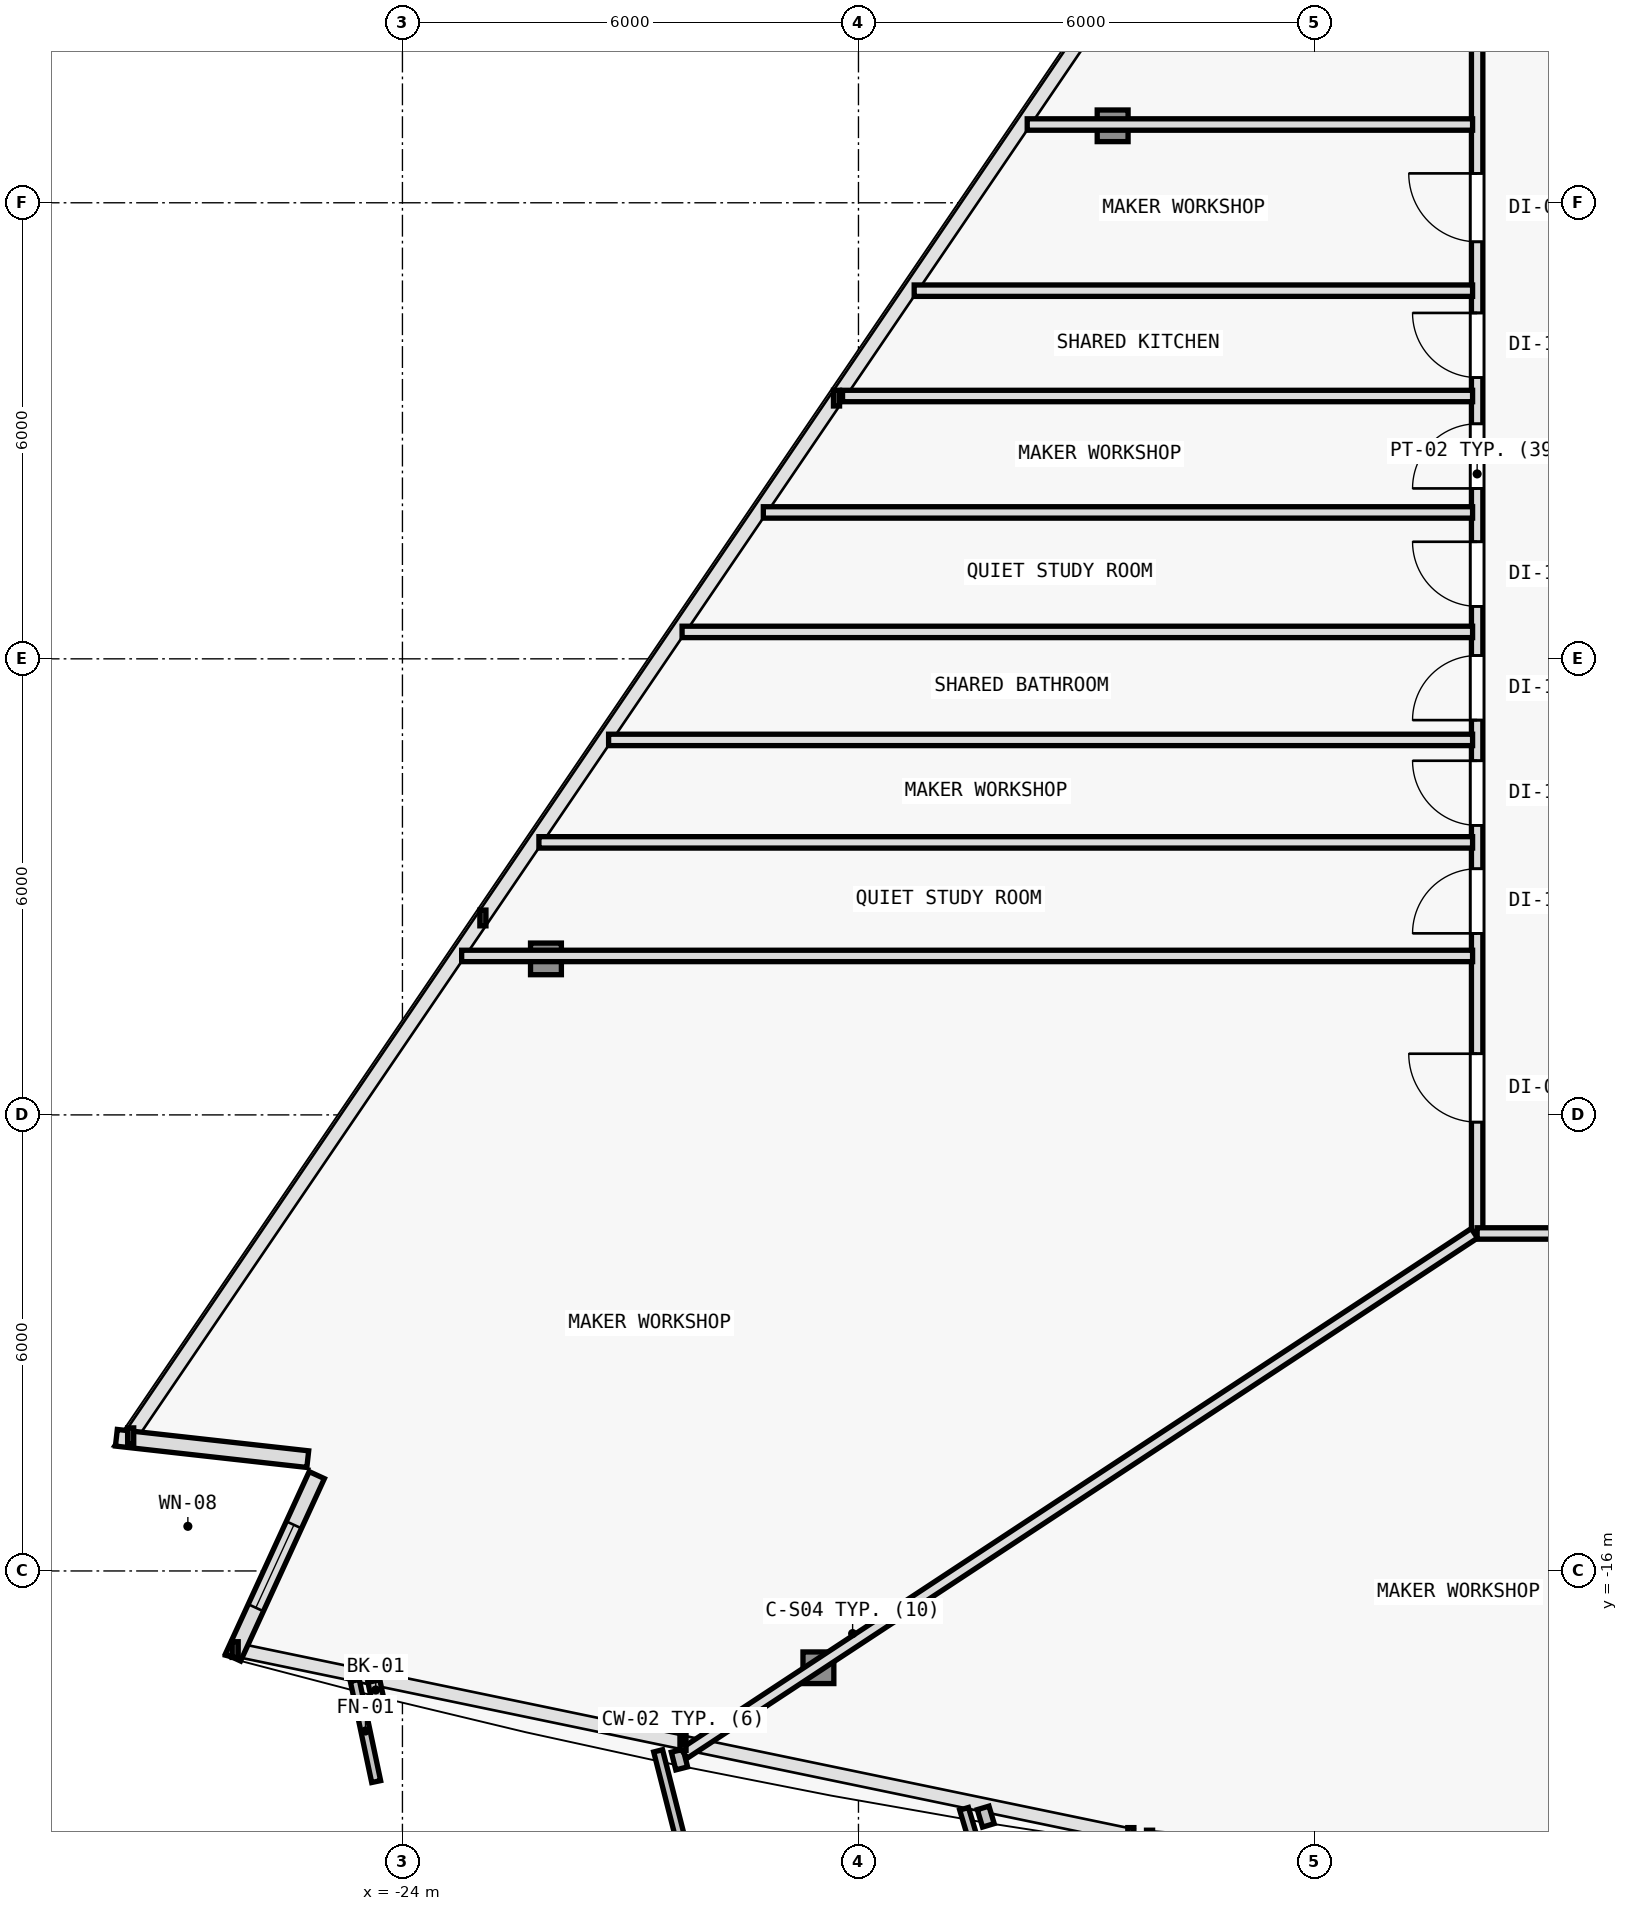
"""IFC4 building model, lengths in metres.
Left out: names, types, materials, properties, quantities, classifications, styles, units other than length and angle.
Written with IfcOpenShell. Run it as: python <this file> out.ifc"""

import sys

from ifc_helpers import new_model, si_unit, direction, frame, frame_2d, origin, origin_2d, place, context, subcontext, project, spatial, rectangle, i_section, extrude, element, fill, save


model = new_model("IFC4")
c1 = context("Model", 3, precision=1e-05, world=origin(), true_north=direction((0.0, 1.0)))
c2 = subcontext(c1, "Body", "Model", "MODEL_VIEW")
j1 = project(units=[si_unit("LENGTHUNIT", "METRE"), si_unit("PLANEANGLEUNIT", "RADIAN")], contexts=[c1])
p1 = place(None, origin())
s1 = spatial("IfcSite", under=j1, at=p1, CompositionType="ELEMENT")
p2 = place(p1, origin())
s2 = spatial("IfcBuilding", under=s1, at=p2, CompositionType="ELEMENT")
p3 = place(p2, frame((0.0, 0.0, 118.5)))
s3 = spatial("IfcBuildingStorey", under=s2, at=p3, CompositionType="ELEMENT", Elevation=118.5)
p4 = place(p3, frame((-18.527, -17.274, 0.006), z_axis=(0.020664238418, 0.033511412961, 0.999224686671), x_axis=(-0.851183725565, 0.524867855115, 0.0)))
e1 = element("IfcColumn", 1, at=p4, inside=s3, PredefinedType="COLUMN", context=c2, shape_type="SweptSolid", body=[
    extrude(i_section(OverallWidth=0.406, OverallDepth=0.416, WebThickness=0.019, FlangeThickness=0.031, FilletRadius=0.015, at=origin_2d()), origin(), (0.0, 0.0, 1.0), 3.592),
])
p5 = place(p3, frame((-14.656, 3.013, 0.006), z_axis=(0.017003572908, 0.009522000828, 0.999810086971), x_axis=(-0.488603368932, 0.87250601595, 0.0)))
e2 = element("IfcColumn", 2, at=p5, inside=s3, PredefinedType="COLUMN", context=c2, shape_type="SweptSolid", body=[
    extrude(i_section(OverallWidth=0.406, OverallDepth=0.416, WebThickness=0.019, FlangeThickness=0.031, FilletRadius=0.015, at=origin_2d()), origin(), (0.0, 0.0, 1.0), 3.59),
])
p6 = place(p3, frame((-22.112, -7.948, 0.006), z_axis=(0.025292109804, 0.02162067451, 0.999446274502), x_axis=(-0.649781149204, 0.760121344352, 0.0)))
e3 = element("IfcColumn", 3, at=p6, inside=s3, PredefinedType="COLUMN", context=c2, shape_type="SweptSolid", body=[
    extrude(i_section(OverallWidth=0.406, OverallDepth=0.416, WebThickness=0.019, FlangeThickness=0.031, FilletRadius=0.015, at=origin_2d()), origin(), (0.0, 0.0, 1.0), 3.591),
])
p7 = place(p3, frame((-25.246, -14.529, 0.0), z_axis=(0.0, 0.0, 1.0), x_axis=(-0.993831926713, 0.110896805395, 0.0)))
e4 = element("IfcWall", 4, at=p7, inside=s3, PredefinedType="SOLIDWALL", context=c2, shape_type="SweptSolid", body=[
    extrude(rectangle(XDim=2.534, YDim=0.22, at=frame_2d((1.267, 0.0))), origin(), (0.0, 0.0, 1.0), 3.35),
])
p8 = place(p3, frame((-26.229, -17.139, 0.0), z_axis=(0.0, 0.0, 1.0), x_axis=(0.417498108462, 0.908677791866, 0.0)))
e5 = element("IfcWall", 5, at=p8, inside=s3, PredefinedType="SOLIDWALL", context=c2, shape_type="SweptSolid", body=[
    extrude(rectangle(XDim=2.641, YDim=0.22, at=frame_2d((1.32, 0.0))), origin(), (0.0, 0.0, 1.0), 3.35),
])
p9 = place(p8, frame((0.72, 0.0, 0.62)))
e6 = element("IfcOpeningElement", 6, at=p9, cuts=e5, PredefinedType="OPENING", context=c2, shape_type="SweptSolid", body=[
    extrude(rectangle(XDim=1.2, YDim=1.8, at=frame_2d((0.6, 0.9))), frame((0.0, 0.12, 0.0), z_axis=(0.0, -1.0, 0.0), x_axis=(1.0, 0.0, 0.0)), (0.0, 0.0, 1.0), 0.24),
])
p10 = place(p3, frame((-9.86, -11.56, 0.0), z_axis=(0.0, 0.0, 1.0), x_axis=(0.0, 1.0, 0.0)))
e7 = element("IfcWall", 7, at=p10, inside=s3, PredefinedType="PARTITIONING", context=c2, shape_type="SweptSolid", body=[
    extrude(rectangle(XDim=19.986, YDim=0.15, at=frame_2d((9.993, 0.0))), origin(), (0.0, 0.0, 1.0), 2.705),
])
p11 = place(p10, frame((11.261, 0.0, 0.0)))
e8 = element("IfcOpeningElement", 8, at=p11, cuts=e7, PredefinedType="OPENING", context=c2, shape_type="SweptSolid", body=[
    extrude(rectangle(XDim=0.85, YDim=2.1, at=frame_2d((0.425, 1.05))), frame((0.0, 0.085, 0.0), z_axis=(0.0, -1.0, 0.0), x_axis=(1.0, 0.0, 0.0)), (0.0, 0.0, 1.0), 0.17),
])
p12 = place(p10, frame((9.802, 0.0, 0.0)))
e9 = element("IfcOpeningElement", 9, at=p12, cuts=e7, PredefinedType="OPENING", context=c2, shape_type="SweptSolid", body=[
    extrude(rectangle(XDim=0.85, YDim=2.1, at=frame_2d((0.425, 1.05))), frame((0.0, 0.085, 0.0), z_axis=(0.0, -1.0, 0.0), x_axis=(1.0, 0.0, 0.0)), (0.0, 0.0, 1.0), 0.17),
])
p13 = place(p10, frame((8.25, 0.0, 0.0)))
e10 = element("IfcOpeningElement", 10, at=p13, cuts=e7, PredefinedType="OPENING", context=c2, shape_type="SweptSolid", body=[
    extrude(rectangle(XDim=0.85, YDim=2.1, at=frame_2d((0.425, 1.05))), frame((0.0, 0.085, 0.0), z_axis=(0.0, -1.0, 0.0), x_axis=(1.0, 0.0, 0.0)), (0.0, 0.0, 1.0), 0.17),
])
p14 = place(p10, frame((6.754, 0.0, 0.0)))
e11 = element("IfcOpeningElement", 11, at=p14, cuts=e7, PredefinedType="OPENING", context=c2, shape_type="SweptSolid", body=[
    extrude(rectangle(XDim=0.85, YDim=2.1, at=frame_2d((0.425, 1.05))), frame((0.0, 0.085, 0.0), z_axis=(0.0, -1.0, 0.0), x_axis=(1.0, 0.0, 0.0)), (0.0, 0.0, 1.0), 0.17),
])
p15 = place(p10, frame((5.369, 0.0, 0.0)))
e12 = element("IfcOpeningElement", 12, at=p15, cuts=e7, PredefinedType="OPENING", context=c2, shape_type="SweptSolid", body=[
    extrude(rectangle(XDim=0.85, YDim=2.1, at=frame_2d((0.425, 1.05))), frame((0.0, 0.085, 0.0), z_axis=(0.0, -1.0, 0.0), x_axis=(1.0, 0.0, 0.0)), (0.0, 0.0, 1.0), 0.17),
])
p16 = place(p10, frame((3.948, 0.0, 0.0)))
e13 = element("IfcOpeningElement", 13, at=p16, cuts=e7, PredefinedType="OPENING", context=c2, shape_type="SweptSolid", body=[
    extrude(rectangle(XDim=0.85, YDim=2.1, at=frame_2d((0.425, 1.05))), frame((0.0, 0.085, 0.0), z_axis=(0.0, -1.0, 0.0), x_axis=(1.0, 0.0, 0.0)), (0.0, 0.0, 1.0), 0.17),
])
p17 = place(p10, frame((1.465, 0.0, 0.0)))
e14 = element("IfcOpeningElement", 14, at=p17, cuts=e7, PredefinedType="OPENING", context=c2, shape_type="SweptSolid", body=[
    extrude(rectangle(XDim=0.9, YDim=2.1, at=frame_2d((0.45, 1.05))), frame((0.0, 0.085, 0.0), z_axis=(0.0, -1.0, 0.0), x_axis=(1.0, 0.0, 0.0)), (0.0, 0.0, 1.0), 0.17),
])
p18 = place(p10, frame((13.047, 0.0, 0.0)))
e15 = element("IfcOpeningElement", 15, at=p18, cuts=e7, PredefinedType="OPENING", context=c2, shape_type="SweptSolid", body=[
    extrude(rectangle(XDim=0.9, YDim=2.1, at=frame_2d((0.45, 1.05))), frame((0.0, 0.085, 0.0), z_axis=(0.0, -1.0, 0.0), x_axis=(1.0, 0.0, 0.0)), (0.0, 0.0, 1.0), 0.17),
])
p19 = place(p3, frame((13.18, -11.56, 0.0), z_axis=(0.0, 0.0, 1.0), x_axis=(-1.0, 0.0, 0.0)))
e16 = element("IfcWall", 16, at=p19, inside=s3, PredefinedType="PARTITIONING", context=c2, shape_type="SweptSolid", body=[
    extrude(rectangle(XDim=23.04, YDim=0.15, at=frame_2d((11.52, 0.0))), origin(), (0.0, 0.0, 1.0), 2.725),
])
p20 = place(p19, frame((20.669, 0.0, 0.0)))
e17 = element("IfcOpeningElement", 17, at=p20, cuts=e16, PredefinedType="OPENING", context=c2, shape_type="SweptSolid", body=[
    extrude(rectangle(XDim=0.9, YDim=2.1, at=frame_2d((0.45, 1.05))), frame((0.0, 0.085, 0.0), z_axis=(0.0, -1.0, 0.0), x_axis=(1.0, 0.0, 0.0)), (0.0, 0.0, 1.0), 0.17),
])
p21 = place(p19, frame((12.73, 0.0, 0.0)))
e18 = element("IfcOpeningElement", 18, at=p21, cuts=e16, PredefinedType="OPENING", context=c2, shape_type="SweptSolid", body=[
    extrude(rectangle(XDim=0.9, YDim=2.1, at=frame_2d((0.45, 1.05))), frame((0.0, 0.085, 0.0), z_axis=(0.0, -1.0, 0.0), x_axis=(1.0, 0.0, 0.0)), (0.0, 0.0, 1.0), 0.17),
])
p22 = place(p19, frame((3.131, 0.0, 0.0)))
e19 = element("IfcOpeningElement", 19, at=p22, cuts=e16, PredefinedType="OPENING", context=c2, shape_type="SweptSolid", body=[
    extrude(rectangle(XDim=0.9, YDim=2.1, at=frame_2d((0.45, 1.05))), frame((0.0, 0.085, 0.0), z_axis=(0.0, -1.0, 0.0), x_axis=(1.0, 0.0, 0.0)), (0.0, 0.0, 1.0), 0.17),
])
p23 = place(p3, frame((-9.896, -11.558, 0.0), z_axis=(0.0, 0.0, 1.0), x_axis=(-0.835324414442, -0.54975733068, 0.0)))
e20 = element("IfcWall", 20, at=p23, inside=s3, PredefinedType="PARTITIONING", context=c2, shape_type="SweptSolid", body=[
    extrude(rectangle(XDim=12.449, YDim=0.15, at=frame_2d((6.224, 0.0))), origin(), (0.0, 0.0, 1.0), 2.775),
])
p24 = place(p3, frame((-9.92, 3.03, 0.0), z_axis=(0.0, 0.0, 1.0), x_axis=(-1.0, 0.0, 0.0)))
e21 = element("IfcWall", 21, at=p24, inside=s3, PredefinedType="PARTITIONING", context=c2, shape_type="SweptSolid", body=[
    extrude(rectangle(XDim=5.86, YDim=0.15, at=frame_2d((2.93, 0.0))), origin(), (0.0, 0.0, 1.0), 2.885),
])
p25 = place(p3, frame((-9.92, -7.909, 0.0), z_axis=(0.0, 0.0, 1.0), x_axis=(-1.0, 0.0, 0.0)))
e22 = element("IfcWall", 22, at=p25, inside=s3, PredefinedType="PARTITIONING", context=c2, shape_type="SweptSolid", body=[
    extrude(rectangle(XDim=13.301, YDim=0.15, at=frame_2d((6.65, 0.0))), origin(), (0.0, 0.0, 1.0), 2.705),
])
p26 = place(p3, frame((-9.92, -2.074, 0.0), z_axis=(0.0, 0.0, 1.0), x_axis=(-1.0, 0.0, 0.0)))
e23 = element("IfcWall", 23, at=p26, inside=s3, PredefinedType="PARTITIONING", context=c2, shape_type="SweptSolid", body=[
    extrude(rectangle(XDim=9.332, YDim=0.15, at=frame_2d((4.666, 0.0))), origin(), (0.0, 0.0, 1.0), 2.885),
])
p27 = place(p3, frame((-9.92, 0.844, 0.0), z_axis=(0.0, 0.0, 1.0), x_axis=(-1.0, 0.0, 0.0)))
e24 = element("IfcWall", 24, at=p27, inside=s3, PredefinedType="PARTITIONING", context=c2, shape_type="SweptSolid", body=[
    extrude(rectangle(XDim=7.347, YDim=0.15, at=frame_2d((3.673, 0.0))), origin(), (0.0, 0.0, 1.0), 2.885),
])
p28 = place(p3, frame((-9.92, -5.067, 0.0), z_axis=(0.0, 0.0, 1.0), x_axis=(-1.0, 0.0, 0.0)))
e25 = element("IfcWall", 25, at=p28, inside=s3, PredefinedType="PARTITIONING", context=c2, shape_type="SweptSolid", body=[
    extrude(rectangle(XDim=11.368, YDim=0.15, at=frame_2d((5.684, 0.0))), origin(), (0.0, 0.0, 1.0), 2.885),
])
p29 = place(p3, frame((-9.92, -0.542, 0.0), z_axis=(0.0, 0.0, 1.0), x_axis=(-1.0, 0.0, 0.0)))
e26 = element("IfcWall", 26, at=p29, inside=s3, PredefinedType="PARTITIONING", context=c2, shape_type="SweptSolid", body=[
    extrude(rectangle(XDim=8.29, YDim=0.15, at=frame_2d((4.145, 0.0))), origin(), (0.0, 0.0, 1.0), 2.885),
])
p30 = place(p3, frame((-9.92, -3.646, 0.0), z_axis=(0.0, 0.0, 1.0), x_axis=(-1.0, 0.0, 0.0)))
e27 = element("IfcWall", 27, at=p30, inside=s3, PredefinedType="PARTITIONING", context=c2, shape_type="SweptSolid", body=[
    extrude(rectangle(XDim=10.401, YDim=0.15, at=frame_2d((5.2, 0.0))), origin(), (0.0, 0.0, 1.0), 2.885),
])
p31 = place(p3, frame((-9.92, -6.415, 0.0), z_axis=(0.0, 0.0, 1.0), x_axis=(-1.0, 0.0, 0.0)))
e28 = element("IfcWall", 28, at=p31, inside=s3, PredefinedType="PARTITIONING", context=c2, shape_type="SweptSolid", body=[
    extrude(rectangle(XDim=12.284, YDim=0.15, at=frame_2d((6.142, 0.0))), origin(), (0.0, 0.0, 1.0), 2.885),
])
p32 = place(p9, origin())
e29 = element("IfcWindow", 29, at=p32, inside=s3, PartitioningType="SINGLE_PANEL", PredefinedType="WINDOW", context=c2, shape_type="SweptSolid", body=[
    extrude(rectangle(XDim=1.2, YDim=1.8, at=frame_2d((0.6, 0.9))), frame((0.0, 0.03, 0.0), z_axis=(0.0, -1.0, 0.0), x_axis=(1.0, 0.0, 0.0)), (0.0, 0.0, 1.0), 0.06),
])
fill(e6, e29)
p33 = place(p11, origin())
e30 = element("IfcDoor", 30, at=p33, inside=s3, OperationType="SINGLE_SWING_RIGHT", PredefinedType="DOOR", context=c2, shape_type="SweptSolid", body=[
    extrude(rectangle(XDim=0.85, YDim=2.1, at=frame_2d((0.425, 1.05))), frame((0.0, 0.025, 0.0), z_axis=(0.0, -1.0, 0.0), x_axis=(1.0, 0.0, 0.0)), (0.0, 0.0, 1.0), 0.05),
])
fill(e8, e30)
p34 = place(p12, origin())
e31 = element("IfcDoor", 31, at=p34, inside=s3, OperationType="SINGLE_SWING_LEFT", PredefinedType="DOOR", context=c2, shape_type="SweptSolid", body=[
    extrude(rectangle(XDim=0.85, YDim=2.1, at=frame_2d((0.425, 1.05))), frame((0.0, 0.025, 0.0), z_axis=(0.0, -1.0, 0.0), x_axis=(1.0, 0.0, 0.0)), (0.0, 0.0, 1.0), 0.05),
])
fill(e9, e31)
p35 = place(p13, origin())
e32 = element("IfcDoor", 32, at=p35, inside=s3, OperationType="SINGLE_SWING_RIGHT", PredefinedType="DOOR", context=c2, shape_type="SweptSolid", body=[
    extrude(rectangle(XDim=0.85, YDim=2.1, at=frame_2d((0.425, 1.05))), frame((0.0, 0.025, 0.0), z_axis=(0.0, -1.0, 0.0), x_axis=(1.0, 0.0, 0.0)), (0.0, 0.0, 1.0), 0.05),
])
fill(e10, e32)
p36 = place(p14, origin())
e33 = element("IfcDoor", 33, at=p36, inside=s3, OperationType="SINGLE_SWING_LEFT", PredefinedType="DOOR", context=c2, shape_type="SweptSolid", body=[
    extrude(rectangle(XDim=0.85, YDim=2.1, at=frame_2d((0.425, 1.05))), frame((0.0, 0.025, 0.0), z_axis=(0.0, -1.0, 0.0), x_axis=(1.0, 0.0, 0.0)), (0.0, 0.0, 1.0), 0.05),
])
fill(e11, e33)
p37 = place(p15, origin())
e34 = element("IfcDoor", 34, at=p37, inside=s3, OperationType="SINGLE_SWING_RIGHT", PredefinedType="DOOR", context=c2, shape_type="SweptSolid", body=[
    extrude(rectangle(XDim=0.85, YDim=2.1, at=frame_2d((0.425, 1.05))), frame((0.0, 0.025, 0.0), z_axis=(0.0, -1.0, 0.0), x_axis=(1.0, 0.0, 0.0)), (0.0, 0.0, 1.0), 0.05),
])
fill(e12, e34)
p38 = place(p16, origin())
e35 = element("IfcDoor", 35, at=p38, inside=s3, OperationType="SINGLE_SWING_LEFT", PredefinedType="DOOR", context=c2, shape_type="SweptSolid", body=[
    extrude(rectangle(XDim=0.85, YDim=2.1, at=frame_2d((0.425, 1.05))), frame((0.0, 0.025, 0.0), z_axis=(0.0, -1.0, 0.0), x_axis=(1.0, 0.0, 0.0)), (0.0, 0.0, 1.0), 0.05),
])
fill(e13, e35)
p39 = place(p17, origin())
e36 = element("IfcDoor", 36, at=p39, inside=s3, OperationType="SINGLE_SWING_RIGHT", PredefinedType="DOOR", context=c2, shape_type="SweptSolid", body=[
    extrude(rectangle(XDim=0.9, YDim=2.1, at=frame_2d((0.45, 1.05))), frame((0.0, 0.025, 0.0), z_axis=(0.0, -1.0, 0.0), x_axis=(1.0, 0.0, 0.0)), (0.0, 0.0, 1.0), 0.05),
])
fill(e14, e36)
p40 = place(p18, origin())
e37 = element("IfcDoor", 37, at=p40, inside=s3, OperationType="SINGLE_SWING_RIGHT", PredefinedType="DOOR", context=c2, shape_type="SweptSolid", body=[
    extrude(rectangle(XDim=0.9, YDim=2.1, at=frame_2d((0.45, 1.05))), frame((0.0, 0.025, 0.0), z_axis=(0.0, -1.0, 0.0), x_axis=(1.0, 0.0, 0.0)), (0.0, 0.0, 1.0), 0.05),
])
fill(e15, e37)
save(model, sys.argv[1])
